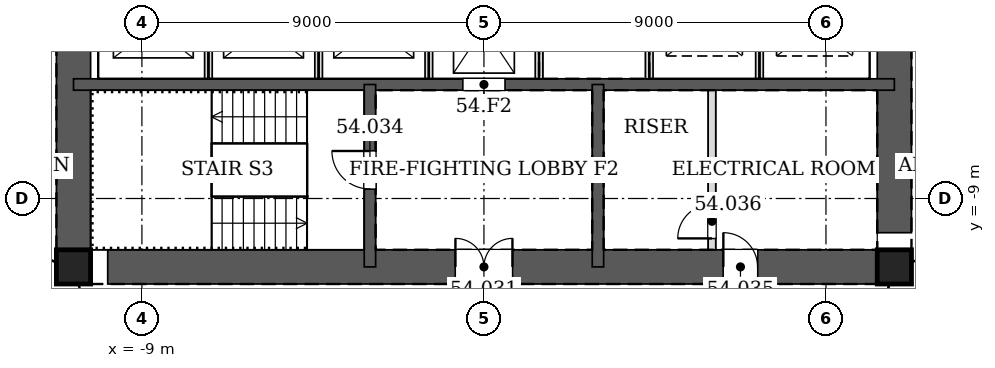
"""IFC4 building model, lengths in metres.
Left out: names, types, materials, properties, quantities, classifications, styles, units other than length and angle.
Written with IfcOpenShell. Run it as: python <this file> out.ifc"""

import sys

from ifc_helpers import new_model, si_unit, direction, frame, frame_2d, origin, origin_2d, place, context, subcontext, project, spatial, rectangle, hollow_rectangle, extrude, element, fill, save


model = new_model("IFC4")
c1 = context("Model", 3, precision=1e-05, world=origin(), true_north=direction((0.0, 1.0)))
c2 = subcontext(c1, "Body", "Model", "MODEL_VIEW")
j1 = project(units=[si_unit("LENGTHUNIT", "METRE"), si_unit("PLANEANGLEUNIT", "RADIAN")], contexts=[c1])
p1 = place(None, origin())
s1 = spatial("IfcSite", under=j1, at=p1, CompositionType="ELEMENT")
p2 = place(p1, origin())
s2 = spatial("IfcBuilding", under=s1, at=p2, CompositionType="ELEMENT")
p3 = place(p2, frame((0.0, 0.0, 231.2)))
s3 = spatial("IfcBuildingStorey", under=s2, at=p3, CompositionType="ELEMENT", Elevation=231.2)
for number, where, z_axis, x_axis in (
    (1, (-10.8, -10.8, 0.0), (0.0, 0.0, 1.0), (1.0, 0.0, 0.0)),
    (2, (10.8, -10.8, 0.0), (0.0, 0.0, 1.0), (1.0, 0.0, 0.0)),
):
    element("IfcColumn", number, at=place(p3, frame(where, z_axis=z_axis, x_axis=x_axis)), inside=s3, PredefinedType="COLUMN", context=c2, shape_type="SweptSolid", body=[
        extrude(hollow_rectangle(XDim=0.9, YDim=0.9, WallThickness=0.05, at=origin_2d()), origin(), (0.0, 0.0, 1.0), 3.4),
    ])
p4 = place(p3, frame((-10.8, -10.8, 0.0), z_axis=(0.0, 0.0, 1.0), x_axis=(1.0, 0.0, 0.0)))
e3 = element("IfcWall", 3, at=p4, inside=s3, PredefinedType="SOLIDWALL", context=c2, shape_type="SweptSolid", body=[
    extrude(rectangle(XDim=21.6, YDim=0.9, at=frame_2d((10.8, 0.0))), origin(), (0.0, 0.0, 1.0), 3.4),
])
p5 = place(p4, frame((10.05, 0.0, 0.0)))
e4 = element("IfcOpeningElement", 4, at=p5, cuts=e3, PredefinedType="OPENING", context=c2, shape_type="SweptSolid", body=[
    extrude(rectangle(XDim=1.5, YDim=2.1, at=frame_2d((0.75, 1.05))), frame((0.0, 0.46, 0.0), z_axis=(0.0, -1.0, 0.0), x_axis=(1.0, 0.0, 0.0)), (0.0, 0.0, 1.0), 0.92),
])
p6 = place(p4, frame((17.1, 0.0, 0.0)))
e5 = element("IfcOpeningElement", 5, at=p6, cuts=e3, PredefinedType="OPENING", context=c2, shape_type="SweptSolid", body=[
    extrude(rectangle(XDim=0.9, YDim=2.1, at=frame_2d((0.45, 1.05))), frame((0.0, 0.46, 0.0), z_axis=(0.0, -1.0, 0.0), x_axis=(1.0, 0.0, 0.0)), (0.0, 0.0, 1.0), 0.92),
])
p7 = place(p3, frame((10.8, -10.8, 0.0), z_axis=(0.0, 0.0, 1.0), x_axis=(0.0, 1.0, 0.0)))
e6 = element("IfcWall", 6, at=p7, inside=s3, PredefinedType="SOLIDWALL", context=c2, shape_type="SweptSolid", body=[
    extrude(rectangle(XDim=21.6, YDim=0.9, at=frame_2d((10.8, 0.0))), origin(), (0.0, 0.0, 1.0), 3.4),
])
p8 = place(p7, frame((11.7, 0.0, 0.0)))
e7 = element("IfcOpeningElement", 7, at=p8, cuts=e6, PredefinedType="OPENING", context=c2, shape_type="SweptSolid", body=[
    extrude(rectangle(XDim=1.2, YDim=2.1, at=frame_2d((0.6, 1.05))), frame((0.0, 0.46, 0.0), z_axis=(0.0, -1.0, 0.0), x_axis=(1.0, 0.0, 0.0)), (0.0, 0.0, 1.0), 0.92),
])
p9 = place(p7, frame((8.7, 0.0, 0.0)))
e8 = element("IfcOpeningElement", 8, at=p9, cuts=e6, PredefinedType="OPENING", context=c2, shape_type="SweptSolid", body=[
    extrude(rectangle(XDim=1.2, YDim=2.1, at=frame_2d((0.6, 1.05))), frame((0.0, 0.46, 0.0), z_axis=(0.0, -1.0, 0.0), x_axis=(1.0, 0.0, 0.0)), (0.0, 0.0, 1.0), 0.92),
])
p10 = place(p3, frame((-10.8, 10.8, 0.0), z_axis=(0.0, 0.0, 1.0), x_axis=(0.0, -1.0, 0.0)))
e9 = element("IfcWall", 9, at=p10, inside=s3, PredefinedType="SOLIDWALL", context=c2, shape_type="SweptSolid", body=[
    extrude(rectangle(XDim=21.6, YDim=0.9, at=frame_2d((10.8, 0.0))), origin(), (0.0, 0.0, 1.0), 3.4),
])
p11 = place(p10, frame((8.7, 0.0, 0.0)))
e10 = element("IfcOpeningElement", 10, at=p11, cuts=e9, PredefinedType="OPENING", context=c2, shape_type="SweptSolid", body=[
    extrude(rectangle(XDim=1.2, YDim=2.1, at=frame_2d((0.6, 1.05))), frame((0.0, 0.46, 0.0), z_axis=(0.0, -1.0, 0.0), x_axis=(1.0, 0.0, 0.0)), (0.0, 0.0, 1.0), 0.92),
])
p12 = place(p10, frame((11.7, 0.0, 0.0)))
e11 = element("IfcOpeningElement", 11, at=p12, cuts=e9, PredefinedType="OPENING", context=c2, shape_type="SweptSolid", body=[
    extrude(rectangle(XDim=1.2, YDim=2.1, at=frame_2d((0.6, 1.05))), frame((0.0, 0.46, 0.0), z_axis=(0.0, -1.0, 0.0), x_axis=(1.0, 0.0, 0.0)), (0.0, 0.0, 1.0), 0.92),
])
p13 = place(p3, frame((-10.8, -6.0, 0.0), z_axis=(0.0, 0.0, 1.0), x_axis=(1.0, 0.0, 0.0)))
e12 = element("IfcWall", 12, at=p13, inside=s3, PredefinedType="SOLIDWALL", context=c2, shape_type="SweptSolid", body=[
    extrude(rectangle(XDim=21.6, YDim=0.3, at=frame_2d((10.8, 0.0))), origin(), (0.0, 0.0, 1.0), 3.4),
])
p14 = place(p13, frame((10.25, 0.0, 0.0)))
e13 = element("IfcOpeningElement", 13, at=p14, cuts=e12, PredefinedType="OPENING", context=c2, shape_type="SweptSolid", body=[
    extrude(rectangle(XDim=1.1, YDim=2.1, at=frame_2d((0.55, 1.05))), frame((0.0, 0.16, 0.0), z_axis=(0.0, -1.0, 0.0), x_axis=(1.0, 0.0, 0.0)), (0.0, 0.0, 1.0), 0.32),
])
p15 = place(p3, frame((-3.0, -6.0, 0.0), z_axis=(0.0, 0.0, 1.0), x_axis=(0.0, -1.0, 0.0)))
e14 = element("IfcWall", 14, at=p15, inside=s3, PredefinedType="SOLIDWALL", context=c2, shape_type="SweptSolid", body=[
    extrude(rectangle(XDim=4.8, YDim=0.3, at=frame_2d((2.4, 0.0))), origin(), (0.0, 0.0, 1.0), 3.4),
])
p16 = place(p15, frame((1.75, 0.0, 0.0)))
e15 = element("IfcOpeningElement", 15, at=p16, cuts=e14, PredefinedType="OPENING", context=c2, shape_type="SweptSolid", body=[
    extrude(rectangle(XDim=1.0, YDim=2.1, at=frame_2d((0.5, 1.05))), frame((0.0, 0.16, 0.0), z_axis=(0.0, -1.0, 0.0), x_axis=(1.0, 0.0, 0.0)), (0.0, 0.0, 1.0), 0.32),
])
p17 = place(p3, frame((3.0, -6.0, 0.0), z_axis=(0.0, 0.0, 1.0), x_axis=(0.0, -1.0, 0.0)))
e16 = element("IfcWall", 16, at=p17, inside=s3, PredefinedType="SOLIDWALL", context=c2, shape_type="SweptSolid", body=[
    extrude(rectangle(XDim=4.8, YDim=0.3, at=frame_2d((2.4, 0.0))), origin(), (0.0, 0.0, 1.0), 3.4),
])
for number, where, z_axis, x_axis in (
    (17, (-7.25, -5.85, 0.0), (0.0, 0.0, 1.0), (0.0, 1.0, 0.0)),
    (18, (-4.35, -5.85, 0.0), (0.0, 0.0, 1.0), (0.0, 1.0, 0.0)),
    (19, (-1.45, -5.85, 0.0), (0.0, 0.0, 1.0), (0.0, 1.0, 0.0)),
):
    element("IfcWall", number, at=place(p3, frame(where, z_axis=z_axis, x_axis=x_axis)), inside=s3, PredefinedType="PARTITIONING", context=c2, shape_type="SweptSolid", body=[
        extrude(rectangle(XDim=2.7, YDim=0.2, at=frame_2d((1.35, 0.0))), origin(), (0.0, 0.0, 1.0), 3.4),
    ])
for number, where, z_axis, x_axis in (
    (20, (1.45, -5.85, 0.0), (0.0, 0.0, 1.0), (0.0, 1.0, 0.0)),
    (21, (4.35, -5.85, 0.0), (0.0, 0.0, 1.0), (0.0, 1.0, 0.0)),
):
    element("IfcWall", number, at=place(p3, frame(where, z_axis=z_axis, x_axis=x_axis)), inside=s3, PredefinedType="PARTITIONING", context=c2, shape_type="SweptSolid", body=[
        extrude(rectangle(XDim=2.7, YDim=0.2, at=frame_2d((1.35, 0.0))), origin(), (0.0, 0.0, 1.0), 3.2),
    ])
p18 = place(p3, frame((7.25, -5.85, 0.0), z_axis=(0.0, 0.0, 1.0), x_axis=(0.0, 1.0, 0.0)))
e22 = element("IfcWall", 22, at=p18, inside=s3, PredefinedType="PARTITIONING", context=c2, shape_type="SweptSolid", body=[
    extrude(rectangle(XDim=2.7, YDim=0.2, at=frame_2d((1.35, 0.0))), origin(), (0.0, 0.0, 1.0), 3.4),
])
p19 = place(p3, frame((6.0, -10.35, 0.0), z_axis=(0.0, 0.0, 1.0), x_axis=(0.0, 1.0, 0.0)))
e23 = element("IfcWall", 23, at=p19, inside=s3, PredefinedType="PARTITIONING", context=c2, shape_type="SweptSolid", body=[
    extrude(rectangle(XDim=4.2, YDim=0.2, at=frame_2d((2.1, 0.0))), origin(), (0.0, 0.0, 1.0), 3.2),
])
p20 = place(p19, frame((0.3, 0.0, 0.0)))
e24 = element("IfcOpeningElement", 24, at=p20, cuts=e23, PredefinedType="OPENING", context=c2, shape_type="SweptSolid", body=[
    extrude(rectangle(XDim=0.9, YDim=2.1, at=frame_2d((0.45, 1.05))), frame((0.0, 0.11, 0.0), z_axis=(0.0, -1.0, 0.0), x_axis=(1.0, 0.0, 0.0)), (0.0, 0.0, 1.0), 0.22),
])
p21 = place(p5, origin())
e25 = element("IfcDoor", 25, at=p21, inside=s3, OperationType="DOUBLE_DOOR_SINGLE_SWING", PredefinedType="DOOR", context=c2, shape_type="SweptSolid", body=[
    extrude(rectangle(XDim=1.5, YDim=2.1, at=frame_2d((0.75, 1.05))), frame((0.0, 0.025, 0.0), z_axis=(0.0, -1.0, 0.0), x_axis=(1.0, 0.0, 0.0)), (0.0, 0.0, 1.0), 0.05),
])
fill(e4, e25)
p22 = place(p16, frame((1.0, 0.0, 0.0), z_axis=(0.0, 0.0, 1.0), x_axis=(-1.0, 0.0, 0.0)))
e26 = element("IfcDoor", 26, at=p22, inside=s3, OperationType="SINGLE_SWING_RIGHT", PredefinedType="DOOR", context=c2, shape_type="SweptSolid", body=[
    extrude(rectangle(XDim=1.0, YDim=2.1, at=frame_2d((0.5, 1.05))), frame((0.0, 0.025, 0.0), z_axis=(0.0, -1.0, 0.0), x_axis=(1.0, 0.0, 0.0)), (0.0, 0.0, 1.0), 0.05),
])
fill(e15, e26)
p23 = place(p6, origin())
e27 = element("IfcDoor", 27, at=p23, inside=s3, OperationType="SINGLE_SWING_LEFT", PredefinedType="DOOR", context=c2, shape_type="SweptSolid", body=[
    extrude(rectangle(XDim=0.9, YDim=2.1, at=frame_2d((0.45, 1.05))), frame((0.0, 0.025, 0.0), z_axis=(0.0, -1.0, 0.0), x_axis=(1.0, 0.0, 0.0)), (0.0, 0.0, 1.0), 0.05),
])
fill(e5, e27)
p24 = place(p20, origin())
e28 = element("IfcDoor", 28, at=p24, inside=s3, OperationType="SINGLE_SWING_LEFT", PredefinedType="DOOR", context=c2, shape_type="SweptSolid", body=[
    extrude(rectangle(XDim=0.9, YDim=2.1, at=frame_2d((0.45, 1.05))), frame((0.0, 0.025, 0.0), z_axis=(0.0, -1.0, 0.0), x_axis=(1.0, 0.0, 0.0)), (0.0, 0.0, 1.0), 0.05),
])
fill(e24, e28)
p25 = place(p14, origin())
e29 = element("IfcDoor", 29, at=p25, inside=s3, OperationType="DOUBLE_DOOR_SLIDING", PredefinedType="DOOR", context=c2, shape_type="SweptSolid", body=[
    extrude(rectangle(XDim=1.1, YDim=2.1, at=frame_2d((0.55, 1.05))), frame((0.0, 0.025, 0.0), z_axis=(0.0, -1.0, 0.0), x_axis=(1.0, 0.0, 0.0)), (0.0, 0.0, 1.0), 0.05),
])
fill(e13, e29)
save(model, sys.argv[1])
